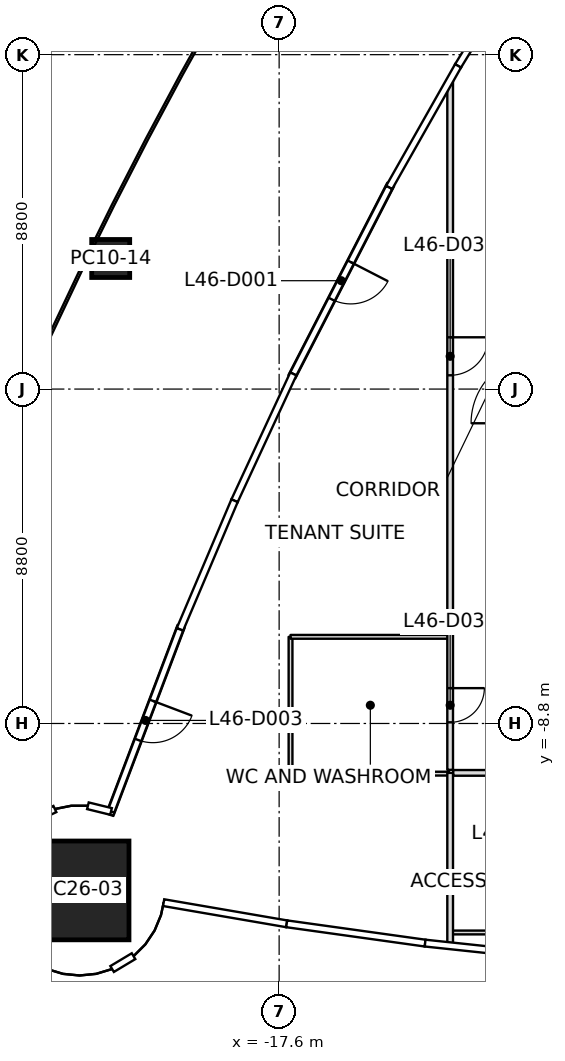
"""IFC4 building model, lengths in metres.
Left out: names, types, materials, properties, quantities, classifications, styles, units other than length and angle.
Written with IfcOpenShell. Run it as: python <this file> out.ifc"""

import sys

from ifc_helpers import new_model, si_unit, direction, frame, frame_2d, origin, origin_2d, place, context, subcontext, project, spatial, rectangle, extrude, element, fill, save


model = new_model("IFC4")
c1 = context("Model", 3, precision=1e-05, world=origin(), true_north=direction((0.0, 1.0)))
c2 = subcontext(c1, "Body", "Model", "MODEL_VIEW")
j1 = project(units=[si_unit("LENGTHUNIT", "METRE"), si_unit("PLANEANGLEUNIT", "RADIAN")], contexts=[c1])
p1 = place(None, origin())
s1 = spatial("IfcSite", under=j1, at=p1, CompositionType="ELEMENT")
p2 = place(p1, origin())
s2 = spatial("IfcBuilding", under=s1, at=p2, CompositionType="ELEMENT")
p3 = place(p2, frame((0.0, 0.0, 205.8)))
s3 = spatial("IfcBuildingStorey", under=s2, at=p3, CompositionType="ELEMENT", Elevation=205.8)
p4 = place(p3, frame((-22.851, -13.193, 0.0), z_axis=(0.027939561831, 0.016104900269, 0.999479871269), x_axis=(0.999609614242, -0.000450139585, -0.027935935454)))
e1 = element("IfcColumn", 1, at=p4, inside=s3, PredefinedType="COLUMN", context=c2, shape_type="SweptSolid", body=[
    extrude(rectangle(XDim=2.6, YDim=2.6, at=origin_2d()), origin(), (0.0, 0.0, 1.0), 4.002),
])
p5 = place(p3, frame((-22.032, 3.436, 0.0), z_axis=(0.014097691364, 0.002013955909, 0.999898594398), x_axis=(0.440047461755, 0.897938764749, -0.008012874933)))
e2 = element("IfcColumn", 2, at=p5, inside=s3, PredefinedType="COLUMN", context=c2, shape_type="SweptSolid", body=[
    extrude(rectangle(XDim=1.0, YDim=1.0, at=origin_2d()), origin(), (0.0, 0.0, 1.0), 4.0),
])
p6 = place(p3, frame((-14.664, 5.385, 0.0), z_axis=(0.0, 0.0, 1.0), x_axis=(-0.457077813433, -0.889426710003, 0.0)))
e3 = element("IfcWall", 3, at=p6, inside=s3, PredefinedType="SOLIDWALL", context=c2, shape_type="SweptSolid", body=[
    extrude(rectangle(XDim=5.697, YDim=0.2, at=frame_2d((2.848, 0.0))), origin(), (0.0, 0.0, 1.0), 3.34),
])
p7 = place(p6, frame((2.298, 0.0, 0.0)))
e4 = element("IfcOpeningElement", 4, at=p7, cuts=e3, PredefinedType="OPENING", context=c2, shape_type="SweptSolid", body=[
    extrude(rectangle(XDim=1.1, YDim=2.1, at=frame_2d((0.55, 1.05))), frame((0.0, 0.1, 0.0), z_axis=(0.0, -1.0, 0.0), x_axis=(1.0, 0.0, 0.0)), (0.0, 0.0, 1.0), 0.2),
])
p8 = place(p3, frame((-20.178, -6.24, 0.0), z_axis=(0.0, 0.0, 1.0), x_axis=(-0.354043410173, -0.935228989988, 0.0)))
e5 = element("IfcWall", 5, at=p8, inside=s3, PredefinedType="SOLIDWALL", context=c2, shape_type="SweptSolid", body=[
    extrude(rectangle(XDim=5.302, YDim=0.2, at=frame_2d((2.651, 0.0))), origin(), (0.0, 0.0, 1.0), 3.34),
])
p9 = place(p8, frame((2.101, 0.0, 0.0)))
e6 = element("IfcOpeningElement", 6, at=p9, cuts=e5, PredefinedType="OPENING", context=c2, shape_type="SweptSolid", body=[
    extrude(rectangle(XDim=1.1, YDim=2.1, at=frame_2d((0.55, 1.05))), frame((0.0, 0.1, 0.0), z_axis=(0.0, -1.0, 0.0), x_axis=(1.0, 0.0, 0.0)), (0.0, 0.0, 1.0), 0.2),
])
p10 = place(p3, frame((-13.1, -10.1, 0.0), z_axis=(0.0, 0.0, 1.0), x_axis=(0.0, -1.0, 0.0)))
e7 = element("IfcWall", 7, at=p10, inside=s3, PredefinedType="PARTITIONING", context=c2, shape_type="SweptSolid", body=[
    extrude(rectangle(XDim=4.555, YDim=0.15, at=frame_2d((2.277, 0.0))), origin(), (0.0, 0.0, 1.0), 3.45),
])
p11 = place(p3, frame((-13.1, 8.145, 0.0), z_axis=(0.0, 0.0, 1.0), x_axis=(0.0, -1.0, 0.0)))
e8 = element("IfcWall", 8, at=p11, inside=s3, PredefinedType="PARTITIONING", context=c2, shape_type="SweptSolid", body=[
    extrude(rectangle(XDim=18.165, YDim=0.15, at=frame_2d((9.083, 0.0))), origin(), (0.0, 0.0, 1.0), 3.166),
])
p12 = place(p11, frame((16.015, 0.0, 0.0)))
e9 = element("IfcOpeningElement", 9, at=p12, cuts=e8, PredefinedType="OPENING", context=c2, shape_type="SweptSolid", body=[
    extrude(rectangle(XDim=0.9, YDim=2.1, at=frame_2d((0.45, 1.05))), frame((0.0, 0.075, 0.0), z_axis=(0.0, -1.0, 0.0), x_axis=(1.0, 0.0, 0.0)), (0.0, 0.0, 1.0), 0.15),
])
p13 = place(p11, frame((6.783, 0.0, 0.0)))
e10 = element("IfcOpeningElement", 10, at=p13, cuts=e8, PredefinedType="OPENING", context=c2, shape_type="SweptSolid", body=[
    extrude(rectangle(XDim=1.0, YDim=2.1, at=frame_2d((0.5, 1.05))), frame((0.0, 0.075, 0.0), z_axis=(0.0, -1.0, 0.0), x_axis=(1.0, 0.0, 0.0)), (0.0, 0.0, 1.0), 0.15),
])
p14 = place(p3, frame((-13.02, -10.1, 0.0), z_axis=(0.0, 0.0, 1.0), x_axis=(1.0, 0.0, 0.0)))
e11 = element("IfcWall", 11, at=p14, inside=s3, PredefinedType="PARTITIONING", context=c2, shape_type="SweptSolid", body=[
    extrude(rectangle(XDim=26.04, YDim=0.15, at=frame_2d((13.02, 0.0))), origin(), (0.0, 0.0, 1.0), 3.317),
])
p15 = place(p14, frame((1.27, 0.0, 0.0)))
e12 = element("IfcOpeningElement", 12, at=p15, cuts=e11, PredefinedType="OPENING", context=c2, shape_type="SweptSolid", body=[
    extrude(rectangle(XDim=0.9, YDim=2.1, at=frame_2d((0.45, 1.05))), frame((0.0, 0.075, 0.0), z_axis=(0.0, -1.0, 0.0), x_axis=(1.0, 0.0, 0.0)), (0.0, 0.0, 1.0), 0.15),
])
p16 = place(p14, frame((10.12, 0.0, 0.0)))
e13 = element("IfcOpeningElement", 13, at=p16, cuts=e11, PredefinedType="OPENING", context=c2, shape_type="SweptSolid", body=[
    extrude(rectangle(XDim=1.0, YDim=2.1, at=frame_2d((0.5, 1.05))), frame((0.0, 0.075, 0.0), z_axis=(0.0, -1.0, 0.0), x_axis=(1.0, 0.0, 0.0)), (0.0, 0.0, 1.0), 0.15),
])
p17 = place(p14, frame((21.37, 0.0, 0.0)))
e14 = element("IfcOpeningElement", 14, at=p17, cuts=e11, PredefinedType="OPENING", context=c2, shape_type="SweptSolid", body=[
    extrude(rectangle(XDim=1.0, YDim=2.1, at=frame_2d((0.5, 1.05))), frame((0.0, 0.075, 0.0), z_axis=(0.0, -1.0, 0.0), x_axis=(1.0, 0.0, 0.0)), (0.0, 0.0, 1.0), 0.15),
])
p18 = place(p3, frame((-13.13, -10.12, 0.0), z_axis=(0.0, 0.0, 1.0), x_axis=(-1.0, 0.0, 0.0)))
e15 = element("IfcWall", 15, at=p18, inside=s3, PredefinedType="PARTITIONING", context=c2, shape_type="SweptSolid", body=[
    extrude(rectangle(XDim=4.17, YDim=0.1, at=frame_2d((2.085, 0.0))), origin(), (0.0, 0.0, 1.0), 3.166),
])
p19 = place(p3, frame((-17.3, -10.12, 0.0), z_axis=(0.0, 0.0, 1.0), x_axis=(0.0, 1.0, 0.0)))
e16 = element("IfcWall", 16, at=p19, inside=s3, PredefinedType="PARTITIONING", context=c2, shape_type="SweptSolid", body=[
    extrude(rectangle(XDim=3.6, YDim=0.1, at=frame_2d((1.8, 0.0))), origin(), (0.0, 0.0, 1.0), 3.317),
])
p20 = place(p3, frame((-17.3, -6.52, 0.0), z_axis=(0.0, 0.0, 1.0), x_axis=(1.0, 0.0, 0.0)))
e17 = element("IfcWall", 17, at=p20, inside=s3, PredefinedType="PARTITIONING", context=c2, shape_type="SweptSolid", body=[
    extrude(rectangle(XDim=4.17, YDim=0.1, at=frame_2d((2.085, 0.0))), origin(), (0.0, 0.0, 1.0), 3.45),
])
p21 = place(p3, frame((-9.5, -14.3, 0.0), z_axis=(0.0, 0.0, 1.0), x_axis=(-1.0, 0.0, 0.0)))
e18 = element("IfcWall", 18, at=p21, inside=s3, PredefinedType="PARTITIONING", context=c2, shape_type="SweptSolid", body=[
    extrude(rectangle(XDim=3.57, YDim=0.1, at=frame_2d((1.785, 0.0))), origin(), (0.0, 0.0, 1.0), 3.393),
])
p22 = place(p7, origin())
e19 = element("IfcDoor", 19, at=p22, inside=s3, OperationType="SINGLE_SWING_RIGHT", PredefinedType="DOOR", context=c2, shape_type="SweptSolid", body=[
    extrude(rectangle(XDim=1.1, YDim=2.1, at=frame_2d((0.55, 1.05))), frame((0.0, 0.025, 0.0), z_axis=(0.0, -1.0, 0.0), x_axis=(1.0, 0.0, 0.0)), (0.0, 0.0, 1.0), 0.05),
])
fill(e4, e19)
p23 = place(p9, origin())
e20 = element("IfcDoor", 20, at=p23, inside=s3, OperationType="SINGLE_SWING_RIGHT", PredefinedType="DOOR", context=c2, shape_type="SweptSolid", body=[
    extrude(rectangle(XDim=1.1, YDim=2.1, at=frame_2d((0.55, 1.05))), frame((0.0, 0.025, 0.0), z_axis=(0.0, -1.0, 0.0), x_axis=(1.0, 0.0, 0.0)), (0.0, 0.0, 1.0), 0.05),
])
fill(e6, e20)
p24 = place(p12, origin())
e21 = element("IfcDoor", 21, at=p24, inside=s3, OperationType="SINGLE_SWING_LEFT", PredefinedType="DOOR", context=c2, shape_type="SweptSolid", body=[
    extrude(rectangle(XDim=0.9, YDim=2.1, at=frame_2d((0.45, 1.05))), frame((0.0, 0.025, 0.0), z_axis=(0.0, -1.0, 0.0), x_axis=(1.0, 0.0, 0.0)), (0.0, 0.0, 1.0), 0.05),
])
fill(e9, e21)
p25 = place(p13, origin())
e22 = element("IfcDoor", 22, at=p25, inside=s3, OperationType="SINGLE_SWING_RIGHT", PredefinedType="DOOR", context=c2, shape_type="SweptSolid", body=[
    extrude(rectangle(XDim=1.0, YDim=2.1, at=frame_2d((0.5, 1.05))), frame((0.0, 0.025, 0.0), z_axis=(0.0, -1.0, 0.0), x_axis=(1.0, 0.0, 0.0)), (0.0, 0.0, 1.0), 0.05),
])
fill(e10, e22)
save(model, sys.argv[1])
